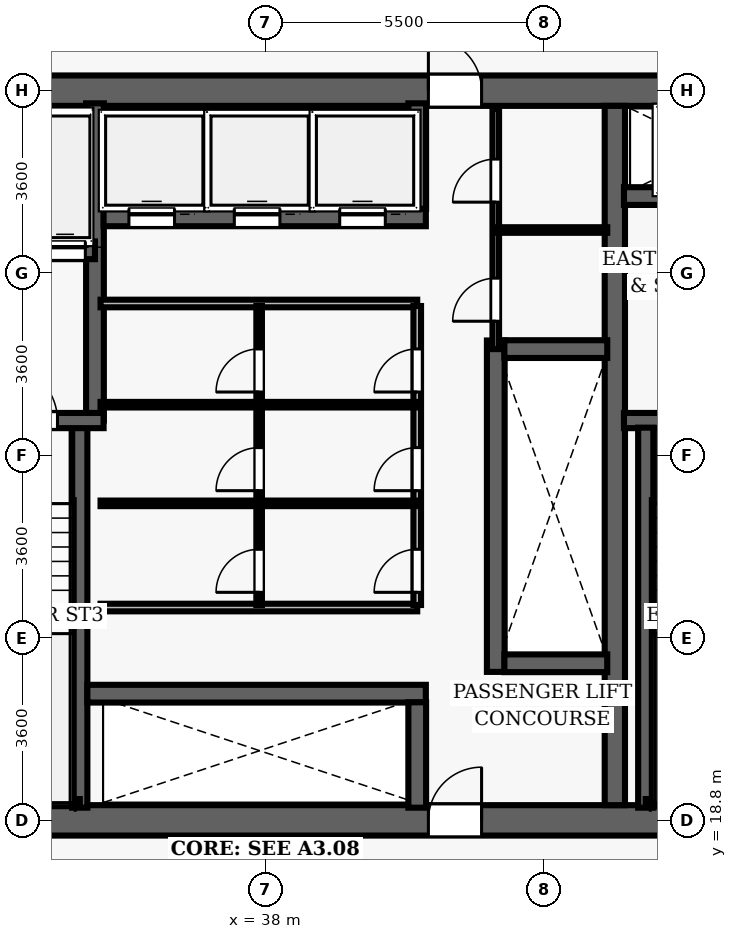
"""IFC4 building model, lengths in metres.
Left out: names, types, materials, properties, quantities, classifications, styles, units other than length and angle.
Written with IfcOpenShell. Run it as: python <this file> out.ifc"""

import sys

from ifc_helpers import new_model, si_unit, direction, frame, frame_2d, origin, place, context, subcontext, project, spatial, rectangle, extrude, element, fill, save


model = new_model("IFC4")
c1 = context("Model", 3, precision=1e-05, world=origin(), true_north=direction((0.0, 1.0)))
c2 = subcontext(c1, "Body", "Model", "MODEL_VIEW")
j1 = project(units=[si_unit("LENGTHUNIT", "METRE"), si_unit("PLANEANGLEUNIT", "RADIAN")], contexts=[c1])
p1 = place(None, origin())
s1 = spatial("IfcSite", under=j1, at=p1, CompositionType="ELEMENT")
p2 = place(p1, origin())
s2 = spatial("IfcBuilding", under=s1, at=p2, CompositionType="ELEMENT")
p3 = place(p2, frame((0.0, 0.0, 90.4)))
s3 = spatial("IfcBuildingStorey", under=s2, at=p3, CompositionType="ELEMENT", Elevation=90.4)
p4 = place(p3, frame((26.7, 18.8, 0.0), z_axis=(0.0, 0.0, 1.0), x_axis=(1.0, 0.0, 0.0)))
e1 = element("IfcWall", 1, at=p4, inside=s3, PredefinedType="SHEAR", context=c2, shape_type="SweptSolid", body=[
    extrude(rectangle(XDim=22.6, YDim=0.6, at=frame_2d((11.3, 0.0))), origin(), (0.0, 0.0, 1.0), 3.5),
])
p5 = place(p4, frame((14.52, 0.0, 0.0)))
e2 = element("IfcOpeningElement", 2, at=p5, cuts=e1, PredefinedType="OPENING", context=c2, shape_type="SweptSolid", body=[
    extrude(rectangle(XDim=1.05, YDim=2.15, at=frame_2d((0.525, 1.075))), frame((0.0, 0.31, 0.0), z_axis=(0.0, -1.0, 0.0), x_axis=(1.0, 0.0, 0.0)), (0.0, 0.0, 1.0), 0.62),
])
p6 = place(p3, frame((26.7, 33.2, 0.0), z_axis=(0.0, 0.0, 1.0), x_axis=(1.0, 0.0, 0.0)))
e3 = element("IfcWall", 3, at=p6, inside=s3, PredefinedType="SHEAR", context=c2, shape_type="SweptSolid", body=[
    extrude(rectangle(XDim=22.6, YDim=0.6, at=frame_2d((11.3, 0.0))), origin(), (0.0, 0.0, 1.0), 3.5),
])
p7 = place(p6, frame((4.62, 0.0, 0.0)))
e4 = element("IfcOpeningElement", 4, at=p7, cuts=e3, PredefinedType="OPENING", context=c2, shape_type="SweptSolid", body=[
    extrude(rectangle(XDim=1.05, YDim=2.15, at=frame_2d((0.525, 1.075))), frame((0.0, 0.31, 0.0), z_axis=(0.0, -1.0, 0.0), x_axis=(1.0, 0.0, 0.0)), (0.0, 0.0, 1.0), 0.62),
])
p8 = place(p6, frame((14.52, 0.0, 0.0)))
e5 = element("IfcOpeningElement", 5, at=p8, cuts=e3, PredefinedType="OPENING", context=c2, shape_type="SweptSolid", body=[
    extrude(rectangle(XDim=1.05, YDim=2.15, at=frame_2d((0.525, 1.075))), frame((0.0, 0.31, 0.0), z_axis=(0.0, -1.0, 0.0), x_axis=(1.0, 0.0, 0.0)), (0.0, 0.0, 1.0), 0.62),
])
p9 = place(p3, frame((44.9, 19.1, 0.0), z_axis=(0.0, 0.0, 1.0), x_axis=(0.0, 1.0, 0.0)))
e6 = element("IfcWall", 6, at=p9, inside=s3, PredefinedType="SHEAR", context=c2, shape_type="SweptSolid", body=[
    extrude(rectangle(XDim=13.8, YDim=0.4, at=frame_2d((6.9, 0.0))), origin(), (0.0, 0.0, 1.0), 3.5),
])
p10 = place(p3, frame((45.08, 26.69, 0.0), z_axis=(0.0, 0.0, 1.0), x_axis=(1.0, 0.0, 0.0)))
e7 = element("IfcWall", 7, at=p10, inside=s3, PredefinedType="SHEAR", context=c2, shape_type="SweptSolid", body=[
    extrude(rectangle(XDim=3.67, YDim=0.3, at=frame_2d((1.835, 0.0))), origin(), (0.0, 0.0, 1.0), 3.5),
])
p11 = place(p10, frame((1.05, 0.0, 0.0)))
e8 = element("IfcOpeningElement", 8, at=p11, cuts=e7, PredefinedType="OPENING", context=c2, shape_type="SweptSolid", body=[
    extrude(rectangle(XDim=1.1, YDim=2.15, at=frame_2d((0.55, 1.075))), frame((0.0, 0.16, 0.0), z_axis=(0.0, -1.0, 0.0), x_axis=(1.0, 0.0, 0.0)), (0.0, 0.0, 1.0), 0.32),
])
p12 = place(p3, frame((45.51, 19.05, 0.0), z_axis=(0.0, 0.0, 1.0), x_axis=(0.0, 1.0, 0.0)))
e9 = element("IfcWall", 9, at=p12, inside=s3, PredefinedType="SHEAR", context=c2, shape_type="SweptSolid", body=[
    extrude(rectangle(XDim=7.5, YDim=0.3, at=frame_2d((3.75, 0.0))), origin(), (0.0, 0.0, 1.0), 3.5),
])
p13 = place(p3, frame((45.51, 19.16, 0.0), z_axis=(0.0, 0.0, 1.0), x_axis=(1.0, 0.0, 0.0)))
e10 = element("IfcWall", 10, at=p13, inside=s3, PredefinedType="SHEAR", context=c2, shape_type="SweptSolid", body=[
    extrude(rectangle(XDim=3.095, YDim=0.12, at=frame_2d((1.547, 0.0))), origin(), (0.0, 0.0, 1.0), 3.5),
])
p14 = place(p3, frame((45.08, 31.12, 0.0), z_axis=(0.0, 0.0, 1.0), x_axis=(1.0, 0.0, 0.0)))
e11 = element("IfcWall", 11, at=p14, inside=s3, PredefinedType="SHEAR", context=c2, shape_type="SweptSolid", body=[
    extrude(rectangle(XDim=3.67, YDim=0.35, at=frame_2d((1.835, 0.0))), origin(), (0.0, 0.0, 1.0), 2.6),
])
p15 = place(p14, frame((1.25, 0.0, 0.0)))
e12 = element("IfcOpeningElement", 12, at=p15, cuts=e11, PredefinedType="OPENING", context=c2, shape_type="SweptSolid", body=[
    extrude(rectangle(XDim=1.1, YDim=2.15, at=frame_2d((0.55, 1.075))), frame((0.0, 0.185, 0.0), z_axis=(0.0, -1.0, 0.0), x_axis=(1.0, 0.0, 0.0)), (0.0, 0.0, 1.0), 0.37),
])
p16 = place(p3, frame((34.34, 19.05, 0.0), z_axis=(0.0, 0.0, 1.0), x_axis=(0.0, 1.0, 0.0)))
e13 = element("IfcWall", 13, at=p16, inside=s3, PredefinedType="SHEAR", context=c2, shape_type="SweptSolid", body=[
    extrude(rectangle(XDim=7.5, YDim=0.3, at=frame_2d((3.75, 0.0))), origin(), (0.0, 0.0, 1.0), 3.5),
])
p17 = place(p3, frame((34.64, 26.69, 0.0), z_axis=(0.0, 0.0, 1.0), x_axis=(0.0, 1.0, 0.0)))
e14 = element("IfcWall", 14, at=p17, inside=s3, PredefinedType="SHEAR", context=c2, shape_type="SweptSolid", body=[
    extrude(rectangle(XDim=6.26, YDim=0.35, at=frame_2d((3.13, 0.0))), origin(), (0.0, 0.0, 1.0), 3.5),
])
p18 = place(p3, frame((31.25, 26.69, 0.0), z_axis=(0.0, 0.0, 1.0), x_axis=(1.0, 0.0, 0.0)))
e15 = element("IfcWall", 15, at=p18, inside=s3, PredefinedType="SHEAR", context=c2, shape_type="SweptSolid", body=[
    extrude(rectangle(XDim=3.56, YDim=0.3, at=frame_2d((1.78, 0.0))), origin(), (0.0, 0.0, 1.0), 3.5),
])
p19 = place(p18, frame((1.55, 0.0, 0.0)))
e16 = element("IfcOpeningElement", 16, at=p19, cuts=e15, PredefinedType="OPENING", context=c2, shape_type="SweptSolid", body=[
    extrude(rectangle(XDim=1.1, YDim=2.15, at=frame_2d((0.55, 1.075))), frame((0.0, 0.16, 0.0), z_axis=(0.0, -1.0, 0.0), x_axis=(1.0, 0.0, 0.0)), (0.0, 0.0, 1.0), 0.32),
])
p20 = place(p3, frame((31.3, 19.16, 0.0), z_axis=(0.0, 0.0, 1.0), x_axis=(1.0, 0.0, 0.0)))
e17 = element("IfcWall", 17, at=p20, inside=s3, PredefinedType="SHEAR", context=c2, shape_type="SweptSolid", body=[
    extrude(rectangle(XDim=3.04, YDim=0.12, at=frame_2d((1.52, 0.0))), origin(), (0.0, 0.0, 1.0), 3.5),
])
p21 = place(p3, frame((32.23, 30.05, 0.0), z_axis=(0.0, 0.0, 1.0), x_axis=(1.0, 0.0, 0.0)))
e18 = element("IfcWall", 18, at=p21, inside=s3, PredefinedType="SHEAR", context=c2, shape_type="SweptSolid", body=[
    extrude(rectangle(XDim=2.41, YDim=0.35, at=frame_2d((1.205, 0.0))), origin(), (0.0, 0.0, 1.0), 2.6),
])
p22 = place(p21, frame((0.42, 0.0, 0.0)))
e19 = element("IfcOpeningElement", 19, at=p22, cuts=e18, PredefinedType="OPENING", context=c2, shape_type="SweptSolid", body=[
    extrude(rectangle(XDim=0.8, YDim=2.15, at=frame_2d((0.4, 1.075))), frame((0.0, 0.185, 0.0), z_axis=(0.0, -1.0, 0.0), x_axis=(1.0, 0.0, 0.0)), (0.0, 0.0, 1.0), 0.37),
])
p23 = place(p21, frame((1.42, 0.0, 0.0)))
e20 = element("IfcOpeningElement", 20, at=p23, cuts=e18, PredefinedType="OPENING", context=c2, shape_type="SweptSolid", body=[
    extrude(rectangle(XDim=0.8, YDim=2.15, at=frame_2d((0.4, 1.075))), frame((0.0, 0.185, 0.0), z_axis=(0.0, -1.0, 0.0), x_axis=(1.0, 0.0, 0.0)), (0.0, 0.0, 1.0), 0.37),
])
p24 = place(p3, frame((42.55, 21.73, 0.0), z_axis=(0.0, 0.0, 1.0), x_axis=(0.0, 1.0, 0.0)))
e21 = element("IfcWall", 21, at=p24, inside=s3, PredefinedType="SHEAR", context=c2, shape_type="SweptSolid", body=[
    extrude(rectangle(XDim=6.54, YDim=0.35, at=frame_2d((3.27, 0.0))), origin(), (0.0, 0.0, 1.0), 2.6),
])
for number, where, z_axis, x_axis in (
    (22, (42.72, 21.9, 0.0), (0.0, 0.0, 1.0), (1.0, 0.0, 0.0)),
    (23, (42.72, 28.1, 0.0), (0.0, 0.0, 1.0), (1.0, 0.0, 0.0)),
):
    element("IfcWall", number, at=place(p3, frame(where, z_axis=z_axis, x_axis=x_axis)), inside=s3, PredefinedType="SHEAR", context=c2, shape_type="SweptSolid", body=[
        extrude(rectangle(XDim=2.03, YDim=0.35, at=frame_2d((1.015, 0.0))), origin(), (0.0, 0.0, 1.0), 2.6),
    ])
p25 = place(p3, frame((34.81, 30.7, 0.0), z_axis=(0.0, 0.0, 1.0), x_axis=(1.0, 0.0, 0.0)))
e24 = element("IfcWall", 24, at=p25, inside=s3, PredefinedType="SHEAR", context=c2, shape_type="SweptSolid", body=[
    extrude(rectangle(XDim=6.36, YDim=0.35, at=frame_2d((3.18, 0.0))), origin(), (0.0, 0.0, 1.0), 2.6),
])
p26 = place(p25, frame((0.5, 0.0, 0.0)))
e25 = element("IfcOpeningElement", 25, at=p26, cuts=e24, PredefinedType="OPENING", context=c2, shape_type="SweptSolid", body=[
    extrude(rectangle(XDim=0.9, YDim=2.15, at=frame_2d((0.45, 1.075))), frame((0.0, 0.185, 0.0), z_axis=(0.0, -1.0, 0.0), x_axis=(1.0, 0.0, 0.0)), (0.0, 0.0, 1.0), 0.37),
])
p27 = place(p25, frame((2.58, 0.0, 0.0)))
e26 = element("IfcOpeningElement", 26, at=p27, cuts=e24, PredefinedType="OPENING", context=c2, shape_type="SweptSolid", body=[
    extrude(rectangle(XDim=0.9, YDim=2.15, at=frame_2d((0.45, 1.075))), frame((0.0, 0.185, 0.0), z_axis=(0.0, -1.0, 0.0), x_axis=(1.0, 0.0, 0.0)), (0.0, 0.0, 1.0), 0.37),
])
p28 = place(p25, frame((4.66, 0.0, 0.0)))
e27 = element("IfcOpeningElement", 27, at=p28, cuts=e24, PredefinedType="OPENING", context=c2, shape_type="SweptSolid", body=[
    extrude(rectangle(XDim=0.9, YDim=2.15, at=frame_2d((0.45, 1.075))), frame((0.0, 0.185, 0.0), z_axis=(0.0, -1.0, 0.0), x_axis=(1.0, 0.0, 0.0)), (0.0, 0.0, 1.0), 0.37),
])
p29 = place(p3, frame((41.0, 30.87, 0.0), z_axis=(0.0, 0.0, 1.0), x_axis=(0.0, 1.0, 0.0)))
e28 = element("IfcWall", 28, at=p29, inside=s3, PredefinedType="SHEAR", context=c2, shape_type="SweptSolid", body=[
    extrude(rectangle(XDim=2.08, YDim=0.35, at=frame_2d((1.04, 0.0))), origin(), (0.0, 0.0, 1.0), 2.6),
])
p30 = place(p3, frame((34.49, 21.3, 0.0), z_axis=(0.0, 0.0, 1.0), x_axis=(1.0, 0.0, 0.0)))
e29 = element("IfcWall", 29, at=p30, inside=s3, PredefinedType="SHEAR", context=c2, shape_type="SweptSolid", body=[
    extrude(rectangle(XDim=6.68, YDim=0.35, at=frame_2d((3.34, 0.0))), origin(), (0.0, 0.0, 1.0), 2.6),
])
p31 = place(p3, frame((41.0, 19.05, 0.0), z_axis=(0.0, 0.0, 1.0), x_axis=(0.0, 1.0, 0.0)))
e30 = element("IfcWall", 30, at=p31, inside=s3, PredefinedType="SHEAR", context=c2, shape_type="SweptSolid", body=[
    extrude(rectangle(XDim=2.08, YDim=0.35, at=frame_2d((1.04, 0.0))), origin(), (0.0, 0.0, 1.0), 2.6),
])
for number, where, z_axis, x_axis in (
    (31, (34.75, 29.0, 0.0), (0.0, 0.0, 1.0), (1.0, 0.0, 0.0)),
    (32, (34.75, 23.0, 0.0), (0.0, 0.0, 1.0), (1.0, 0.0, 0.0)),
):
    element("IfcWall", number, at=place(p3, frame(where, z_axis=z_axis, x_axis=x_axis)), inside=s3, PredefinedType="PARTITIONING", context=c2, shape_type="SweptSolid", body=[
        extrude(rectangle(XDim=6.25, YDim=0.15, at=frame_2d((3.125, 0.0))), origin(), (0.0, 0.0, 1.0), 2.6),
    ])
p32 = place(p3, frame((41.0, 23.05, 0.0), z_axis=(0.0, 0.0, 1.0), x_axis=(0.0, 1.0, 0.0)))
e33 = element("IfcWall", 33, at=p32, inside=s3, PredefinedType="PARTITIONING", context=c2, shape_type="SweptSolid", body=[
    extrude(rectangle(XDim=5.9, YDim=0.15, at=frame_2d((2.95, 0.0))), origin(), (0.0, 0.0, 1.0), 2.6),
])
p33 = place(p32, frame((0.25, 0.0, 0.0)))
e34 = element("IfcOpeningElement", 34, at=p33, cuts=e33, PredefinedType="OPENING", context=c2, shape_type="SweptSolid", body=[
    extrude(rectangle(XDim=0.85, YDim=2.1, at=frame_2d((0.425, 1.05))), frame((0.0, 0.085, 0.0), z_axis=(0.0, -1.0, 0.0), x_axis=(1.0, 0.0, 0.0)), (0.0, 0.0, 1.0), 0.17),
])
p34 = place(p32, frame((2.256, 0.0, 0.0)))
e35 = element("IfcOpeningElement", 35, at=p34, cuts=e33, PredefinedType="OPENING", context=c2, shape_type="SweptSolid", body=[
    extrude(rectangle(XDim=0.85, YDim=2.1, at=frame_2d((0.425, 1.05))), frame((0.0, 0.085, 0.0), z_axis=(0.0, -1.0, 0.0), x_axis=(1.0, 0.0, 0.0)), (0.0, 0.0, 1.0), 0.17),
])
p35 = place(p32, frame((4.203, 0.0, 0.0)))
e36 = element("IfcOpeningElement", 36, at=p35, cuts=e33, PredefinedType="OPENING", context=c2, shape_type="SweptSolid", body=[
    extrude(rectangle(XDim=0.85, YDim=2.1, at=frame_2d((0.425, 1.05))), frame((0.0, 0.085, 0.0), z_axis=(0.0, -1.0, 0.0), x_axis=(1.0, 0.0, 0.0)), (0.0, 0.0, 1.0), 0.17),
])
p36 = place(p3, frame((37.88, 23.05, 0.0), z_axis=(0.0, 0.0, 1.0), x_axis=(0.0, 1.0, 0.0)))
e37 = element("IfcWall", 37, at=p36, inside=s3, PredefinedType="PARTITIONING", context=c2, shape_type="SweptSolid", body=[
    extrude(rectangle(XDim=5.9, YDim=0.11, at=frame_2d((2.95, 0.0))), origin(), (0.0, 0.0, 1.0), 2.6),
])
p37 = place(p36, frame((0.25, 0.0, 0.0)))
e38 = element("IfcOpeningElement", 38, at=p37, cuts=e37, PredefinedType="OPENING", context=c2, shape_type="SweptSolid", body=[
    extrude(rectangle(XDim=0.85, YDim=2.1, at=frame_2d((0.425, 1.05))), frame((0.0, 0.065, 0.0), z_axis=(0.0, -1.0, 0.0), x_axis=(1.0, 0.0, 0.0)), (0.0, 0.0, 1.0), 0.13),
])
p38 = place(p36, frame((2.256, 0.0, 0.0)))
e39 = element("IfcOpeningElement", 39, at=p38, cuts=e37, PredefinedType="OPENING", context=c2, shape_type="SweptSolid", body=[
    extrude(rectangle(XDim=0.85, YDim=2.1, at=frame_2d((0.425, 1.05))), frame((0.0, 0.065, 0.0), z_axis=(0.0, -1.0, 0.0), x_axis=(1.0, 0.0, 0.0)), (0.0, 0.0, 1.0), 0.13),
])
p39 = place(p36, frame((4.203, 0.0, 0.0)))
e40 = element("IfcOpeningElement", 40, at=p39, cuts=e37, PredefinedType="OPENING", context=c2, shape_type="SweptSolid", body=[
    extrude(rectangle(XDim=0.85, YDim=2.1, at=frame_2d((0.425, 1.05))), frame((0.0, 0.065, 0.0), z_axis=(0.0, -1.0, 0.0), x_axis=(1.0, 0.0, 0.0)), (0.0, 0.0, 1.0), 0.13),
])
for number, where, z_axis, x_axis in (
    (41, (34.75, 25.056, 0.0), (0.0, 0.0, 1.0), (1.0, 0.0, 0.0)),
    (42, (34.75, 27.003, 0.0), (0.0, 0.0, 1.0), (1.0, 0.0, 0.0)),
):
    element("IfcWall", number, at=place(p3, frame(where, z_axis=z_axis, x_axis=x_axis)), inside=s3, PredefinedType="PARTITIONING", context=c2, shape_type="SweptSolid", body=[
        extrude(rectangle(XDim=6.25, YDim=0.11, at=frame_2d((3.125, 0.0))), origin(), (0.0, 0.0, 1.0), 2.6),
    ])
p40 = place(p3, frame((42.55, 28.1, 0.0), z_axis=(0.0, 0.0, 1.0), x_axis=(0.0, 1.0, 0.0)))
e43 = element("IfcWall", 43, at=p40, inside=s3, PredefinedType="PARTITIONING", context=c2, shape_type="SweptSolid", body=[
    extrude(rectangle(XDim=4.75, YDim=0.13, at=frame_2d((2.375, 0.0))), origin(), (0.0, 0.0, 1.0), 2.6),
])
p41 = place(p40, frame((0.55, 0.0, 0.0)))
e44 = element("IfcOpeningElement", 44, at=p41, cuts=e43, PredefinedType="OPENING", context=c2, shape_type="SweptSolid", body=[
    extrude(rectangle(XDim=0.85, YDim=2.1, at=frame_2d((0.425, 1.05))), frame((0.0, 0.075, 0.0), z_axis=(0.0, -1.0, 0.0), x_axis=(1.0, 0.0, 0.0)), (0.0, 0.0, 1.0), 0.15),
])
p42 = place(p40, frame((2.9, 0.0, 0.0)))
e45 = element("IfcOpeningElement", 45, at=p42, cuts=e43, PredefinedType="OPENING", context=c2, shape_type="SweptSolid", body=[
    extrude(rectangle(XDim=0.85, YDim=2.1, at=frame_2d((0.425, 1.05))), frame((0.0, 0.075, 0.0), z_axis=(0.0, -1.0, 0.0), x_axis=(1.0, 0.0, 0.0)), (0.0, 0.0, 1.0), 0.15),
])
p43 = place(p3, frame((42.55, 30.45, 0.0), z_axis=(0.0, 0.0, 1.0), x_axis=(1.0, 0.0, 0.0)))
e46 = element("IfcWall", 46, at=p43, inside=s3, PredefinedType="PARTITIONING", context=c2, shape_type="SweptSolid", body=[
    extrude(rectangle(XDim=2.2, YDim=0.11, at=frame_2d((1.1, 0.0))), origin(), (0.0, 0.0, 1.0), 2.6),
])
p44 = place(p19, origin())
e47 = element("IfcDoor", 47, at=p44, inside=s3, OperationType="SINGLE_SWING_LEFT", PredefinedType="DOOR", context=c2, shape_type="SweptSolid", body=[
    extrude(rectangle(XDim=1.1, YDim=2.15, at=frame_2d((0.55, 1.075))), frame((0.0, 0.025, 0.0), z_axis=(0.0, -1.0, 0.0), x_axis=(1.0, 0.0, 0.0)), (0.0, 0.0, 1.0), 0.05),
])
fill(e16, e47)
p45 = place(p8, origin())
e48 = element("IfcDoor", 48, at=p45, inside=s3, OperationType="SINGLE_SWING_LEFT", PredefinedType="DOOR", context=c2, shape_type="SweptSolid", body=[
    extrude(rectangle(XDim=1.05, YDim=2.15, at=frame_2d((0.525, 1.075))), frame((0.0, 0.025, 0.0), z_axis=(0.0, -1.0, 0.0), x_axis=(1.0, 0.0, 0.0)), (0.0, 0.0, 1.0), 0.05),
])
fill(e5, e48)
p46 = place(p5, origin())
e49 = element("IfcDoor", 49, at=p46, inside=s3, OperationType="SINGLE_SWING_RIGHT", PredefinedType="DOOR", context=c2, shape_type="SweptSolid", body=[
    extrude(rectangle(XDim=1.05, YDim=2.15, at=frame_2d((0.525, 1.075))), frame((0.0, 0.025, 0.0), z_axis=(0.0, -1.0, 0.0), x_axis=(1.0, 0.0, 0.0)), (0.0, 0.0, 1.0), 0.05),
])
fill(e2, e49)
p47 = place(p33, origin())
e50 = element("IfcDoor", 50, at=p47, inside=s3, OperationType="SINGLE_SWING_LEFT", PredefinedType="DOOR", context=c2, shape_type="SweptSolid", body=[
    extrude(rectangle(XDim=0.85, YDim=2.1, at=frame_2d((0.425, 1.05))), frame((0.0, 0.025, 0.0), z_axis=(0.0, -1.0, 0.0), x_axis=(1.0, 0.0, 0.0)), (0.0, 0.0, 1.0), 0.05),
])
fill(e34, e50)
p48 = place(p37, origin())
e51 = element("IfcDoor", 51, at=p48, inside=s3, OperationType="SINGLE_SWING_LEFT", PredefinedType="DOOR", context=c2, shape_type="SweptSolid", body=[
    extrude(rectangle(XDim=0.85, YDim=2.1, at=frame_2d((0.425, 1.05))), frame((0.0, 0.025, 0.0), z_axis=(0.0, -1.0, 0.0), x_axis=(1.0, 0.0, 0.0)), (0.0, 0.0, 1.0), 0.05),
])
fill(e38, e51)
p49 = place(p34, origin())
e52 = element("IfcDoor", 52, at=p49, inside=s3, OperationType="SINGLE_SWING_LEFT", PredefinedType="DOOR", context=c2, shape_type="SweptSolid", body=[
    extrude(rectangle(XDim=0.85, YDim=2.1, at=frame_2d((0.425, 1.05))), frame((0.0, 0.025, 0.0), z_axis=(0.0, -1.0, 0.0), x_axis=(1.0, 0.0, 0.0)), (0.0, 0.0, 1.0), 0.05),
])
fill(e35, e52)
p50 = place(p38, origin())
e53 = element("IfcDoor", 53, at=p50, inside=s3, OperationType="SINGLE_SWING_LEFT", PredefinedType="DOOR", context=c2, shape_type="SweptSolid", body=[
    extrude(rectangle(XDim=0.85, YDim=2.1, at=frame_2d((0.425, 1.05))), frame((0.0, 0.025, 0.0), z_axis=(0.0, -1.0, 0.0), x_axis=(1.0, 0.0, 0.0)), (0.0, 0.0, 1.0), 0.05),
])
fill(e39, e53)
p51 = place(p35, origin())
e54 = element("IfcDoor", 54, at=p51, inside=s3, OperationType="SINGLE_SWING_LEFT", PredefinedType="DOOR", context=c2, shape_type="SweptSolid", body=[
    extrude(rectangle(XDim=0.85, YDim=2.1, at=frame_2d((0.425, 1.05))), frame((0.0, 0.025, 0.0), z_axis=(0.0, -1.0, 0.0), x_axis=(1.0, 0.0, 0.0)), (0.0, 0.0, 1.0), 0.05),
])
fill(e36, e54)
p52 = place(p39, origin())
e55 = element("IfcDoor", 55, at=p52, inside=s3, OperationType="SINGLE_SWING_LEFT", PredefinedType="DOOR", context=c2, shape_type="SweptSolid", body=[
    extrude(rectangle(XDim=0.85, YDim=2.1, at=frame_2d((0.425, 1.05))), frame((0.0, 0.025, 0.0), z_axis=(0.0, -1.0, 0.0), x_axis=(1.0, 0.0, 0.0)), (0.0, 0.0, 1.0), 0.05),
])
fill(e40, e55)
p53 = place(p41, origin())
e56 = element("IfcDoor", 56, at=p53, inside=s3, OperationType="SINGLE_SWING_LEFT", PredefinedType="DOOR", context=c2, shape_type="SweptSolid", body=[
    extrude(rectangle(XDim=0.85, YDim=2.1, at=frame_2d((0.425, 1.05))), frame((0.0, 0.025, 0.0), z_axis=(0.0, -1.0, 0.0), x_axis=(1.0, 0.0, 0.0)), (0.0, 0.0, 1.0), 0.05),
])
fill(e44, e56)
p54 = place(p42, origin())
e57 = element("IfcDoor", 57, at=p54, inside=s3, OperationType="SINGLE_SWING_LEFT", PredefinedType="DOOR", context=c2, shape_type="SweptSolid", body=[
    extrude(rectangle(XDim=0.85, YDim=2.1, at=frame_2d((0.425, 1.05))), frame((0.0, 0.025, 0.0), z_axis=(0.0, -1.0, 0.0), x_axis=(1.0, 0.0, 0.0)), (0.0, 0.0, 1.0), 0.05),
])
fill(e45, e57)
p55 = place(p26, origin())
e58 = element("IfcDoor", 58, at=p55, inside=s3, OperationType="SLIDING_TO_LEFT", PredefinedType="DOOR", context=c2, shape_type="SweptSolid", body=[
    extrude(rectangle(XDim=0.9, YDim=2.15, at=frame_2d((0.45, 1.075))), frame((0.0, 0.025, 0.0), z_axis=(0.0, -1.0, 0.0), x_axis=(1.0, 0.0, 0.0)), (0.0, 0.0, 1.0), 0.05),
])
fill(e25, e58)
p56 = place(p27, origin())
e59 = element("IfcDoor", 59, at=p56, inside=s3, OperationType="SLIDING_TO_LEFT", PredefinedType="DOOR", context=c2, shape_type="SweptSolid", body=[
    extrude(rectangle(XDim=0.9, YDim=2.15, at=frame_2d((0.45, 1.075))), frame((0.0, 0.025, 0.0), z_axis=(0.0, -1.0, 0.0), x_axis=(1.0, 0.0, 0.0)), (0.0, 0.0, 1.0), 0.05),
])
fill(e26, e59)
p57 = place(p28, origin())
e60 = element("IfcDoor", 60, at=p57, inside=s3, OperationType="SLIDING_TO_LEFT", PredefinedType="DOOR", context=c2, shape_type="SweptSolid", body=[
    extrude(rectangle(XDim=0.9, YDim=2.15, at=frame_2d((0.45, 1.075))), frame((0.0, 0.025, 0.0), z_axis=(0.0, -1.0, 0.0), x_axis=(1.0, 0.0, 0.0)), (0.0, 0.0, 1.0), 0.05),
])
fill(e27, e60)
p58 = place(p23, origin())
e61 = element("IfcDoor", 61, at=p58, inside=s3, OperationType="SLIDING_TO_LEFT", PredefinedType="DOOR", context=c2, shape_type="SweptSolid", body=[
    extrude(rectangle(XDim=0.8, YDim=2.15, at=frame_2d((0.4, 1.075))), frame((0.0, 0.025, 0.0), z_axis=(0.0, -1.0, 0.0), x_axis=(1.0, 0.0, 0.0)), (0.0, 0.0, 1.0), 0.05),
])
fill(e20, e61)
save(model, sys.argv[1])
